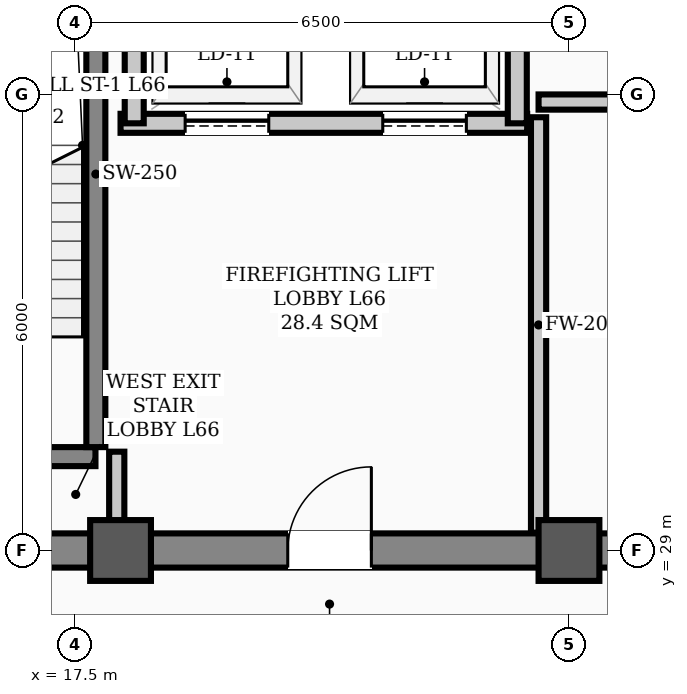
"""IFC4 building model, lengths in metres.
Left out: names, types, materials, properties, quantities, classifications, styles, units other than length and angle.
Written with IfcOpenShell. Run it as: python <this file> out.ifc"""

import sys

from ifc_helpers import new_model, si_unit, direction, frame, frame_2d, origin, origin_2d, place, context, subcontext, project, spatial, rectangle, hollow_rectangle, extrude, element, fill, save


model = new_model("IFC4")
c1 = context("Model", 3, precision=1e-05, world=origin(), true_north=direction((0.0, 1.0)))
c2 = subcontext(c1, "Body", "Model", "MODEL_VIEW")
j1 = project(units=[si_unit("LENGTHUNIT", "METRE"), si_unit("PLANEANGLEUNIT", "RADIAN")], contexts=[c1])
p1 = place(None, origin())
s1 = spatial("IfcSite", under=j1, at=p1, CompositionType="ELEMENT")
p2 = place(p1, origin())
s2 = spatial("IfcBuilding", under=s1, at=p2, CompositionType="ELEMENT")
p3 = place(p2, frame((0.0, 0.0, 265.7)))
s3 = spatial("IfcBuildingStorey", under=s2, at=p3, CompositionType="ELEMENT", Elevation=265.7)
for number, where, z_axis, x_axis in (
    (1, (18.1, 29.0, 0.0), (0.0, 0.0, 1.0), (1.0, 0.0, 0.0)),
    (2, (24.0, 29.0, 0.0), (0.0, 0.0, 1.0), (1.0, 0.0, 0.0)),
):
    element("IfcColumn", number, at=place(p3, frame(where, z_axis=z_axis, x_axis=x_axis)), inside=s3, PredefinedType="COLUMN", context=c2, shape_type="SweptSolid", body=[
        extrude(hollow_rectangle(XDim=0.8, YDim=0.8, WallThickness=0.032, InnerFilletRadius=0.016, OuterFilletRadius=0.048, at=origin_2d()), origin(), (0.0, 0.0, 1.0), 3.9),
    ])
p4 = place(p3, frame((13.5, 29.0, 0.0), z_axis=(0.0, 0.0, 1.0), x_axis=(1.0, 0.0, 0.0)))
e3 = element("IfcWall", 3, at=p4, inside=s3, PredefinedType="SHEAR", context=c2, shape_type="SweptSolid", body=[
    extrude(rectangle(XDim=30.5, YDim=0.45, at=frame_2d((15.25, 0.0))), origin(), (0.0, 0.0, 1.0), 3.72),
])
p5 = place(p4, frame((1.75, 0.0, 0.0)))
e4 = element("IfcOpeningElement", 4, at=p5, cuts=e3, PredefinedType="OPENING", context=c2, shape_type="SweptSolid", body=[
    extrude(rectangle(XDim=1.1, YDim=2.08, at=frame_2d((0.55, 1.04))), frame((0.0, 0.235, 0.0), z_axis=(0.0, -1.0, 0.0), x_axis=(1.0, 0.0, 0.0)), (0.0, 0.0, 1.0), 0.47),
])
p6 = place(p4, frame((26.7, 0.0, 0.0)))
e5 = element("IfcOpeningElement", 5, at=p6, cuts=e3, PredefinedType="OPENING", context=c2, shape_type="SweptSolid", body=[
    extrude(rectangle(XDim=1.1, YDim=2.08, at=frame_2d((0.55, 1.04))), frame((0.0, 0.235, 0.0), z_axis=(0.0, -1.0, 0.0), x_axis=(1.0, 0.0, 0.0)), (0.0, 0.0, 1.0), 0.47),
])
p7 = place(p4, frame((6.8, 0.0, 0.0)))
e6 = element("IfcOpeningElement", 6, at=p7, cuts=e3, PredefinedType="OPENING", context=c2, shape_type="SweptSolid", body=[
    extrude(rectangle(XDim=1.1, YDim=2.08, at=frame_2d((0.55, 1.04))), frame((0.0, 0.235, 0.0), z_axis=(0.0, -1.0, 0.0), x_axis=(1.0, 0.0, 0.0)), (0.0, 0.0, 1.0), 0.47),
])
p8 = place(p4, frame((13.2, 0.0, 0.0)))
e7 = element("IfcOpeningElement", 7, at=p8, cuts=e3, PredefinedType="OPENING", context=c2, shape_type="SweptSolid", body=[
    extrude(rectangle(XDim=1.6, YDim=2.08, at=frame_2d((0.8, 1.04))), frame((0.0, 0.235, 0.0), z_axis=(0.0, -1.0, 0.0), x_axis=(1.0, 0.0, 0.0)), (0.0, 0.0, 1.0), 0.47),
])
p9 = place(p4, frame((20.525, 0.0, 0.0)))
e8 = element("IfcOpeningElement", 8, at=p9, cuts=e3, PredefinedType="OPENING", context=c2, shape_type="SweptSolid", body=[
    extrude(rectangle(XDim=0.95, YDim=2.08, at=frame_2d((0.475, 1.04))), frame((0.0, 0.235, 0.0), z_axis=(0.0, -1.0, 0.0), x_axis=(1.0, 0.0, 0.0)), (0.0, 0.0, 1.0), 0.47),
])
p10 = place(p3, frame((14.43, 30.235, 0.0), z_axis=(0.0, 0.0, 1.0), x_axis=(1.0, 0.0, 0.0)))
e9 = element("IfcWall", 9, at=p10, inside=s3, PredefinedType="STANDARD", context=c2, shape_type="SweptSolid", body=[
    extrude(rectangle(XDim=3.34, YDim=0.25, at=frame_2d((1.67, 0.0))), origin(), (0.0, 0.0, 1.0), 3.72),
])
p11 = place(p10, frame((1.1, 0.0, 0.0)))
e10 = element("IfcOpeningElement", 10, at=p11, cuts=e9, PredefinedType="OPENING", context=c2, shape_type="SweptSolid", body=[
    extrude(rectangle(XDim=1.1, YDim=2.08, at=frame_2d((0.55, 1.04))), frame((0.0, 0.135, 0.0), z_axis=(0.0, -1.0, 0.0), x_axis=(1.0, 0.0, 0.0)), (0.0, 0.0, 1.0), 0.27),
])
p12 = place(p3, frame((17.775, 30.36, 0.0), z_axis=(0.0, 0.0, 1.0), x_axis=(0.0, 1.0, 0.0)))
e11 = element("IfcWall", 11, at=p12, inside=s3, PredefinedType="STANDARD", context=c2, shape_type="SweptSolid", body=[
    extrude(rectangle(XDim=7.184, YDim=0.25, at=frame_2d((3.592, 0.0))), origin(), (0.0, 0.0, 1.0), 3.72),
])
p13 = place(p3, frame((18.1, 34.62, 0.0), z_axis=(0.0, 0.0, 1.0), x_axis=(1.0, 0.0, 0.0)))
e12 = element("IfcWall", 12, at=p13, inside=s3, PredefinedType="STANDARD", context=c2, shape_type="SweptSolid", body=[
    extrude(rectangle(XDim=5.35, YDim=0.25, at=frame_2d((2.675, 0.0))), origin(), (0.0, 0.0, 1.0), 3.72),
])
p14 = place(p13, frame((0.85, 0.0, 0.0)))
e13 = element("IfcOpeningElement", 13, at=p14, cuts=e12, PredefinedType="OPENING", context=c2, shape_type="SweptSolid", body=[
    extrude(rectangle(XDim=1.1, YDim=2.08, at=frame_2d((0.55, 1.04))), frame((0.0, 0.135, 0.0), z_axis=(0.0, -1.0, 0.0), x_axis=(1.0, 0.0, 0.0)), (0.0, 0.0, 1.0), 0.27),
])
p15 = place(p13, frame((3.45, 0.0, 0.0)))
e14 = element("IfcOpeningElement", 14, at=p15, cuts=e12, PredefinedType="OPENING", context=c2, shape_type="SweptSolid", body=[
    extrude(rectangle(XDim=1.1, YDim=2.08, at=frame_2d((0.55, 1.04))), frame((0.0, 0.135, 0.0), z_axis=(0.0, -1.0, 0.0), x_axis=(1.0, 0.0, 0.0)), (0.0, 0.0, 1.0), 0.27),
])
for number, where, z_axis, x_axis in (
    (15, (18.28, 34.62, 0.0), (0.0, 0.0, 1.0), (0.0, 1.0, 0.0)),
    (16, (23.32, 34.62, 0.0), (0.0, 0.0, 1.0), (0.0, 1.0, 0.0)),
):
    element("IfcWall", number, at=place(p3, frame(where, z_axis=z_axis, x_axis=x_axis)), inside=s3, PredefinedType="STANDARD", context=c2, shape_type="SweptSolid", body=[
        extrude(rectangle(XDim=3.33, YDim=0.25, at=frame_2d((1.665, 0.0))), origin(), (0.0, 0.0, 1.0), 3.4),
    ])
p16 = place(p3, frame((23.6, 34.9, 0.0), z_axis=(0.0, 0.0, 1.0), x_axis=(1.0, 0.0, 0.0)))
e17 = element("IfcWall", 17, at=p16, inside=s3, PredefinedType="STANDARD", context=c2, shape_type="SweptSolid", body=[
    extrude(rectangle(XDim=8.18, YDim=0.2, at=frame_2d((4.09, 0.0))), origin(), (0.0, 0.0, 1.0), 3.72),
])
p17 = place(p16, frame((3.45, 0.0, 0.0)))
e18 = element("IfcOpeningElement", 18, at=p17, cuts=e17, PredefinedType="OPENING", context=c2, shape_type="SweptSolid", body=[
    extrude(rectangle(XDim=1.1, YDim=2.08, at=frame_2d((0.55, 1.04))), frame((0.0, 0.11, 0.0), z_axis=(0.0, -1.0, 0.0), x_axis=(1.0, 0.0, 0.0)), (0.0, 0.0, 1.0), 0.22),
])
p18 = place(p3, frame((18.05, 29.235, 0.0), z_axis=(0.0, 0.0, 1.0), x_axis=(0.0, 1.0, 0.0)))
e19 = element("IfcWall", 19, at=p18, inside=s3, PredefinedType="STANDARD", context=c2, shape_type="SweptSolid", body=[
    extrude(rectangle(XDim=1.065, YDim=0.2, at=frame_2d((0.532, 0.0))), origin(), (0.0, 0.0, 1.0), 3.4),
])
p19 = place(p3, frame((23.6, 29.235, 0.0), z_axis=(0.0, 0.0, 1.0), x_axis=(0.0, 1.0, 0.0)))
e20 = element("IfcWall", 20, at=p19, inside=s3, PredefinedType="STANDARD", context=c2, shape_type="SweptSolid", body=[
    extrude(rectangle(XDim=5.465, YDim=0.2, at=frame_2d((2.732, 0.0))), origin(), (0.0, 0.0, 1.0), 3.2),
])
p20 = place(p7, origin())
e21 = element("IfcDoor", 21, at=p20, inside=s3, OperationType="SINGLE_SWING_RIGHT", PredefinedType="DOOR", context=c2, shape_type="SweptSolid", body=[
    extrude(rectangle(XDim=1.1, YDim=2.08, at=frame_2d((0.55, 1.04))), frame((0.0, 0.025, 0.0), z_axis=(0.0, -1.0, 0.0), x_axis=(1.0, 0.0, 0.0)), (0.0, 0.0, 1.0), 0.05),
])
fill(e6, e21)
p21 = place(p14, origin())
e22 = element("IfcDoor", 22, at=p21, inside=s3, OperationType="SLIDING_TO_LEFT", PredefinedType="DOOR", context=c2, shape_type="SweptSolid", body=[
    extrude(rectangle(XDim=1.1, YDim=2.08, at=frame_2d((0.55, 1.04))), frame((0.0, 0.025, 0.0), z_axis=(0.0, -1.0, 0.0), x_axis=(1.0, 0.0, 0.0)), (0.0, 0.0, 1.0), 0.05),
])
fill(e13, e22)
p22 = place(p15, origin())
e23 = element("IfcDoor", 23, at=p22, inside=s3, OperationType="SLIDING_TO_LEFT", PredefinedType="DOOR", context=c2, shape_type="SweptSolid", body=[
    extrude(rectangle(XDim=1.1, YDim=2.08, at=frame_2d((0.55, 1.04))), frame((0.0, 0.025, 0.0), z_axis=(0.0, -1.0, 0.0), x_axis=(1.0, 0.0, 0.0)), (0.0, 0.0, 1.0), 0.05),
])
fill(e14, e23)
save(model, sys.argv[1])
